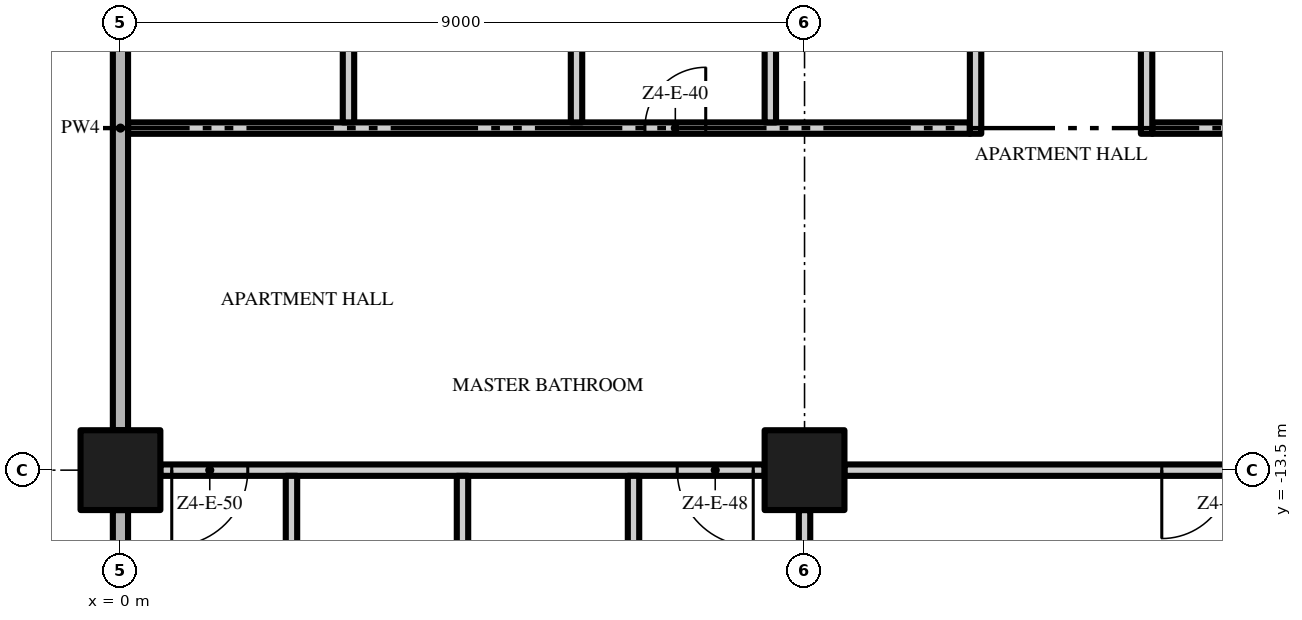
"""IFC4 building model, lengths in metres.
Left out: names, types, materials, properties, quantities, classifications, styles, units other than length and angle.
Written with IfcOpenShell. Run it as: python <this file> out.ifc"""

import sys

from ifc_helpers import new_model, si_unit, direction, frame, frame_2d, origin, origin_2d, place, context, subcontext, project, spatial, rectangle, extrude, element, fill, save


model = new_model("IFC4")
c1 = context("Model", 3, precision=1e-05, world=origin(), true_north=direction((0.0, 1.0)))
c2 = subcontext(c1, "Body", "Model", "MODEL_VIEW")
j1 = project(units=[si_unit("LENGTHUNIT", "METRE"), si_unit("PLANEANGLEUNIT", "RADIAN")], contexts=[c1])
p1 = place(None, origin())
s1 = spatial("IfcSite", under=j1, at=p1, CompositionType="ELEMENT")
p2 = place(p1, origin())
s2 = spatial("IfcBuilding", under=s1, at=p2, CompositionType="ELEMENT")
p3 = place(p2, frame((0.0, 0.0, 230.0)))
s3 = spatial("IfcBuildingStorey", under=s2, at=p3, CompositionType="ELEMENT", Elevation=230.0)
for number, where, z_axis, x_axis in (
    (1, (0.0, -13.5, 0.0), (0.0, 0.0, 1.0), (1.0, 0.0, 0.0)),
    (2, (9.0, -13.5, 0.0), (0.0, 0.0, 1.0), (1.0, 0.0, 0.0)),
):
    element("IfcColumn", number, at=place(p3, frame(where, z_axis=z_axis, x_axis=x_axis)), inside=s3, PredefinedType="COLUMN", context=c2, shape_type="SweptSolid", body=[
        extrude(rectangle(XDim=1.05, YDim=1.05, at=origin_2d()), origin(), (0.0, 0.0, 1.0), 3.5),
    ])
p4 = place(p3, frame((8.475, -13.5, 0.0), z_axis=(0.0, 0.0, 1.0), x_axis=(-1.0, 0.0, 0.0)))
e3 = element("IfcWall", 3, at=p4, inside=s3, PredefinedType="PARTITIONING", context=c2, shape_type="SweptSolid", body=[
    extrude(rectangle(XDim=7.95, YDim=0.15, at=frame_2d((3.975, 0.0))), origin(), (0.0, 0.0, 1.0), 3.5),
])
p5 = place(p4, frame((0.15, 0.0, 0.0)))
e4 = element("IfcOpeningElement", 4, at=p5, cuts=e3, PredefinedType="OPENING", context=c2, shape_type="SweptSolid", body=[
    extrude(rectangle(XDim=1.0, YDim=2.4, at=frame_2d((0.5, 1.2))), frame((0.0, 0.085, 0.0), z_axis=(0.0, -1.0, 0.0), x_axis=(1.0, 0.0, 0.0)), (0.0, 0.0, 1.0), 0.17),
])
p6 = place(p4, frame((6.8, 0.0, 0.0)))
e5 = element("IfcOpeningElement", 5, at=p6, cuts=e3, PredefinedType="OPENING", context=c2, shape_type="SweptSolid", body=[
    extrude(rectangle(XDim=1.0, YDim=2.4, at=frame_2d((0.5, 1.2))), frame((0.0, 0.085, 0.0), z_axis=(0.0, -1.0, 0.0), x_axis=(1.0, 0.0, 0.0)), (0.0, 0.0, 1.0), 0.17),
])
p7 = place(p3, frame((17.475, -13.5, 0.0), z_axis=(0.0, 0.0, 1.0), x_axis=(-1.0, 0.0, 0.0)))
e6 = element("IfcWall", 6, at=p7, inside=s3, PredefinedType="PARTITIONING", context=c2, shape_type="SweptSolid", body=[
    extrude(rectangle(XDim=7.95, YDim=0.15, at=frame_2d((3.975, 0.0))), origin(), (0.0, 0.0, 1.0), 3.5),
])
p8 = place(p7, frame((1.975, 0.0, 0.0)))
e7 = element("IfcOpeningElement", 7, at=p8, cuts=e6, PredefinedType="OPENING", context=c2, shape_type="SweptSolid", body=[
    extrude(rectangle(XDim=1.8, YDim=2.4, at=frame_2d((0.9, 1.2))), frame((0.0, 0.085, 0.0), z_axis=(0.0, -1.0, 0.0), x_axis=(1.0, 0.0, 0.0)), (0.0, 0.0, 1.0), 0.17),
])
p9 = place(p3, frame((0.1, -9.0, 0.0), z_axis=(0.0, 0.0, 1.0), x_axis=(1.0, 0.0, 0.0)))
e8 = element("IfcWall", 8, at=p9, inside=s3, PredefinedType="PARTITIONING", context=c2, shape_type="SweptSolid", body=[
    extrude(rectangle(XDim=11.075, YDim=0.15, at=frame_2d((5.537, 0.0))), origin(), (0.0, 0.0, 1.0), 3.5),
])
p10 = place(p9, frame((6.8, 0.0, 0.0)))
e9 = element("IfcOpeningElement", 9, at=p10, cuts=e8, PredefinedType="OPENING", context=c2, shape_type="SweptSolid", body=[
    extrude(rectangle(XDim=0.8, YDim=2.0, at=frame_2d((0.4, 1.0))), frame((0.0, 0.085, 0.0), z_axis=(0.0, -1.0, 0.0), x_axis=(1.0, 0.0, 0.0)), (0.0, 0.0, 1.0), 0.17),
])
p11 = place(p3, frame((13.575, -9.0, 0.0), z_axis=(0.0, 0.0, 1.0), x_axis=(1.0, 0.0, 0.0)))
e10 = element("IfcWall", 10, at=p11, inside=s3, PredefinedType="PARTITIONING", context=c2, shape_type="SweptSolid", body=[
    extrude(rectangle(XDim=13.125, YDim=0.15, at=frame_2d((6.562, 0.0))), origin(), (0.0, 0.0, 1.0), 3.5),
])
p12 = place(p11, frame((12.125, 0.0, 0.0)))
e11 = element("IfcOpeningElement", 11, at=p12, cuts=e10, PredefinedType="OPENING", context=c2, shape_type="SweptSolid", body=[
    extrude(rectangle(XDim=0.8, YDim=2.0, at=frame_2d((0.4, 1.0))), frame((0.0, 0.085, 0.0), z_axis=(0.0, -1.0, 0.0), x_axis=(1.0, 0.0, 0.0)), (0.0, 0.0, 1.0), 0.17),
])
p13 = place(p3, frame((0.0, -21.55, 0.0), z_axis=(0.0, 0.0, 1.0), x_axis=(0.0, 1.0, 0.0)))
e12 = element("IfcWall", 12, at=p13, inside=s3, PredefinedType="PARTITIONING", context=c2, shape_type="SweptSolid", body=[
    extrude(rectangle(XDim=7.525, YDim=0.2, at=frame_2d((3.763, 0.0))), origin(), (0.0, 0.0, 1.0), 3.5),
])
p14 = place(p3, frame((0.0, -12.975, 0.0), z_axis=(0.0, 0.0, 1.0), x_axis=(0.0, 1.0, 0.0)))
e13 = element("IfcWall", 13, at=p14, inside=s3, PredefinedType="PARTITIONING", context=c2, shape_type="SweptSolid", body=[
    extrude(rectangle(XDim=7.95, YDim=0.2, at=frame_2d((3.975, 0.0))), origin(), (0.0, 0.0, 1.0), 3.5),
])
p15 = place(p3, frame((2.25, -16.575, 0.0), z_axis=(0.0, 0.0, 1.0), x_axis=(0.0, 1.0, 0.0)))
e14 = element("IfcWall", 14, at=p15, inside=s3, PredefinedType="PARTITIONING", context=c2, shape_type="SweptSolid", body=[
    extrude(rectangle(XDim=3.0, YDim=0.15, at=frame_2d((1.5, 0.0))), origin(), (0.0, 0.0, 1.0), 3.5),
])
p16 = place(p3, frame((3.0, -8.925, 0.0), z_axis=(0.0, 0.0, 1.0), x_axis=(0.0, 1.0, 0.0)))
e15 = element("IfcWall", 15, at=p16, inside=s3, PredefinedType="PARTITIONING", context=c2, shape_type="SweptSolid", body=[
    extrude(rectangle(XDim=4.35, YDim=0.15, at=frame_2d((2.175, 0.0))), origin(), (0.0, 0.0, 1.0), 3.5),
])
p17 = place(p3, frame((4.5, -22.2, 0.0), z_axis=(0.0, 0.0, 1.0), x_axis=(0.0, 1.0, 0.0)))
e16 = element("IfcWall", 16, at=p17, inside=s3, PredefinedType="PARTITIONING", context=c2, shape_type="SweptSolid", body=[
    extrude(rectangle(XDim=8.625, YDim=0.15, at=frame_2d((4.312, 0.0))), origin(), (0.0, 0.0, 1.0), 3.5),
])
p18 = place(p3, frame((6.0, -8.925, 0.0), z_axis=(0.0, 0.0, 1.0), x_axis=(0.0, 1.0, 0.0)))
e17 = element("IfcWall", 17, at=p18, inside=s3, PredefinedType="PARTITIONING", context=c2, shape_type="SweptSolid", body=[
    extrude(rectangle(XDim=4.35, YDim=0.15, at=frame_2d((2.175, 0.0))), origin(), (0.0, 0.0, 1.0), 3.5),
])
p19 = place(p3, frame((6.75, -16.575, 0.0), z_axis=(0.0, 0.0, 1.0), x_axis=(0.0, 1.0, 0.0)))
e18 = element("IfcWall", 18, at=p19, inside=s3, PredefinedType="PARTITIONING", context=c2, shape_type="SweptSolid", body=[
    extrude(rectangle(XDim=3.0, YDim=0.15, at=frame_2d((1.5, 0.0))), origin(), (0.0, 0.0, 1.0), 3.5),
])
p20 = place(p3, frame((8.55, -8.925, 0.0), z_axis=(0.0, 0.0, 1.0), x_axis=(0.0, 1.0, 0.0)))
e19 = element("IfcWall", 19, at=p20, inside=s3, PredefinedType="PARTITIONING", context=c2, shape_type="SweptSolid", body=[
    extrude(rectangle(XDim=3.9, YDim=0.15, at=frame_2d((1.95, 0.0))), origin(), (0.0, 0.0, 1.0), 3.5),
])
p21 = place(p3, frame((9.0, -21.55, 0.0), z_axis=(0.0, 0.0, 1.0), x_axis=(0.0, 1.0, 0.0)))
e20 = element("IfcWall", 20, at=p21, inside=s3, PredefinedType="PARTITIONING", context=c2, shape_type="SweptSolid", body=[
    extrude(rectangle(XDim=7.525, YDim=0.15, at=frame_2d((3.763, 0.0))), origin(), (0.0, 0.0, 1.0), 3.5),
])
p22 = place(p3, frame((11.25, -9.075, 0.0), z_axis=(0.0, 0.0, 1.0), x_axis=(0.0, 1.0, 0.0)))
e21 = element("IfcWall", 21, at=p22, inside=s3, PredefinedType="PARTITIONING", context=c2, shape_type="SweptSolid", body=[
    extrude(rectangle(XDim=4.65, YDim=0.15, at=frame_2d((2.325, 0.0))), origin(), (0.0, 0.0, 1.0), 3.5),
])
p23 = place(p3, frame((13.5, -4.425, 0.0), z_axis=(0.0, 0.0, 1.0), x_axis=(0.0, -1.0, 0.0)))
e22 = element("IfcWall", 22, at=p23, inside=s3, PredefinedType="PARTITIONING", context=c2, shape_type="SweptSolid", body=[
    extrude(rectangle(XDim=4.65, YDim=0.15, at=frame_2d((2.325, 0.0))), origin(), (0.0, 0.0, 1.0), 3.5),
])
p24 = place(p23, frame((1.875, 0.0, 0.0)))
e23 = element("IfcOpeningElement", 23, at=p24, cuts=e22, PredefinedType="OPENING", context=c2, shape_type="SweptSolid", body=[
    extrude(rectangle(XDim=0.9, YDim=2.1, at=frame_2d((0.45, 1.05))), frame((0.0, 0.085, 0.0), z_axis=(0.0, -1.0, 0.0), x_axis=(1.0, 0.0, 0.0)), (0.0, 0.0, 1.0), 0.17),
])
p25 = place(p10, origin())
e24 = element("IfcDoor", 24, at=p25, inside=s3, OperationType="SINGLE_SWING_RIGHT", PredefinedType="DOOR", context=c2, shape_type="SweptSolid", body=[
    extrude(rectangle(XDim=0.8, YDim=2.0, at=frame_2d((0.4, 1.0))), frame((0.0, 0.025, 0.0), z_axis=(0.0, -1.0, 0.0), x_axis=(1.0, 0.0, 0.0)), (0.0, 0.0, 1.0), 0.05),
])
fill(e9, e24)
p26 = place(p8, origin())
e25 = element("IfcDoor", 25, at=p26, inside=s3, OperationType="DOUBLE_DOOR_SINGLE_SWING", PredefinedType="DOOR", context=c2, shape_type="SweptSolid", body=[
    extrude(rectangle(XDim=1.8, YDim=2.4, at=frame_2d((0.9, 1.2))), frame((0.0, 0.025, 0.0), z_axis=(0.0, -1.0, 0.0), x_axis=(1.0, 0.0, 0.0)), (0.0, 0.0, 1.0), 0.05),
])
fill(e7, e25)
p27 = place(p5, origin())
e26 = element("IfcDoor", 26, at=p27, inside=s3, OperationType="SINGLE_SWING_LEFT", PredefinedType="DOOR", context=c2, shape_type="SweptSolid", body=[
    extrude(rectangle(XDim=1.0, YDim=2.4, at=frame_2d((0.5, 1.2))), frame((0.0, 0.025, 0.0), z_axis=(0.0, -1.0, 0.0), x_axis=(1.0, 0.0, 0.0)), (0.0, 0.0, 1.0), 0.05),
])
fill(e4, e26)
p28 = place(p6, origin())
e27 = element("IfcDoor", 27, at=p28, inside=s3, OperationType="SINGLE_SWING_RIGHT", PredefinedType="DOOR", context=c2, shape_type="SweptSolid", body=[
    extrude(rectangle(XDim=1.0, YDim=2.4, at=frame_2d((0.5, 1.2))), frame((0.0, 0.025, 0.0), z_axis=(0.0, -1.0, 0.0), x_axis=(1.0, 0.0, 0.0)), (0.0, 0.0, 1.0), 0.05),
])
fill(e5, e27)
save(model, sys.argv[1])
